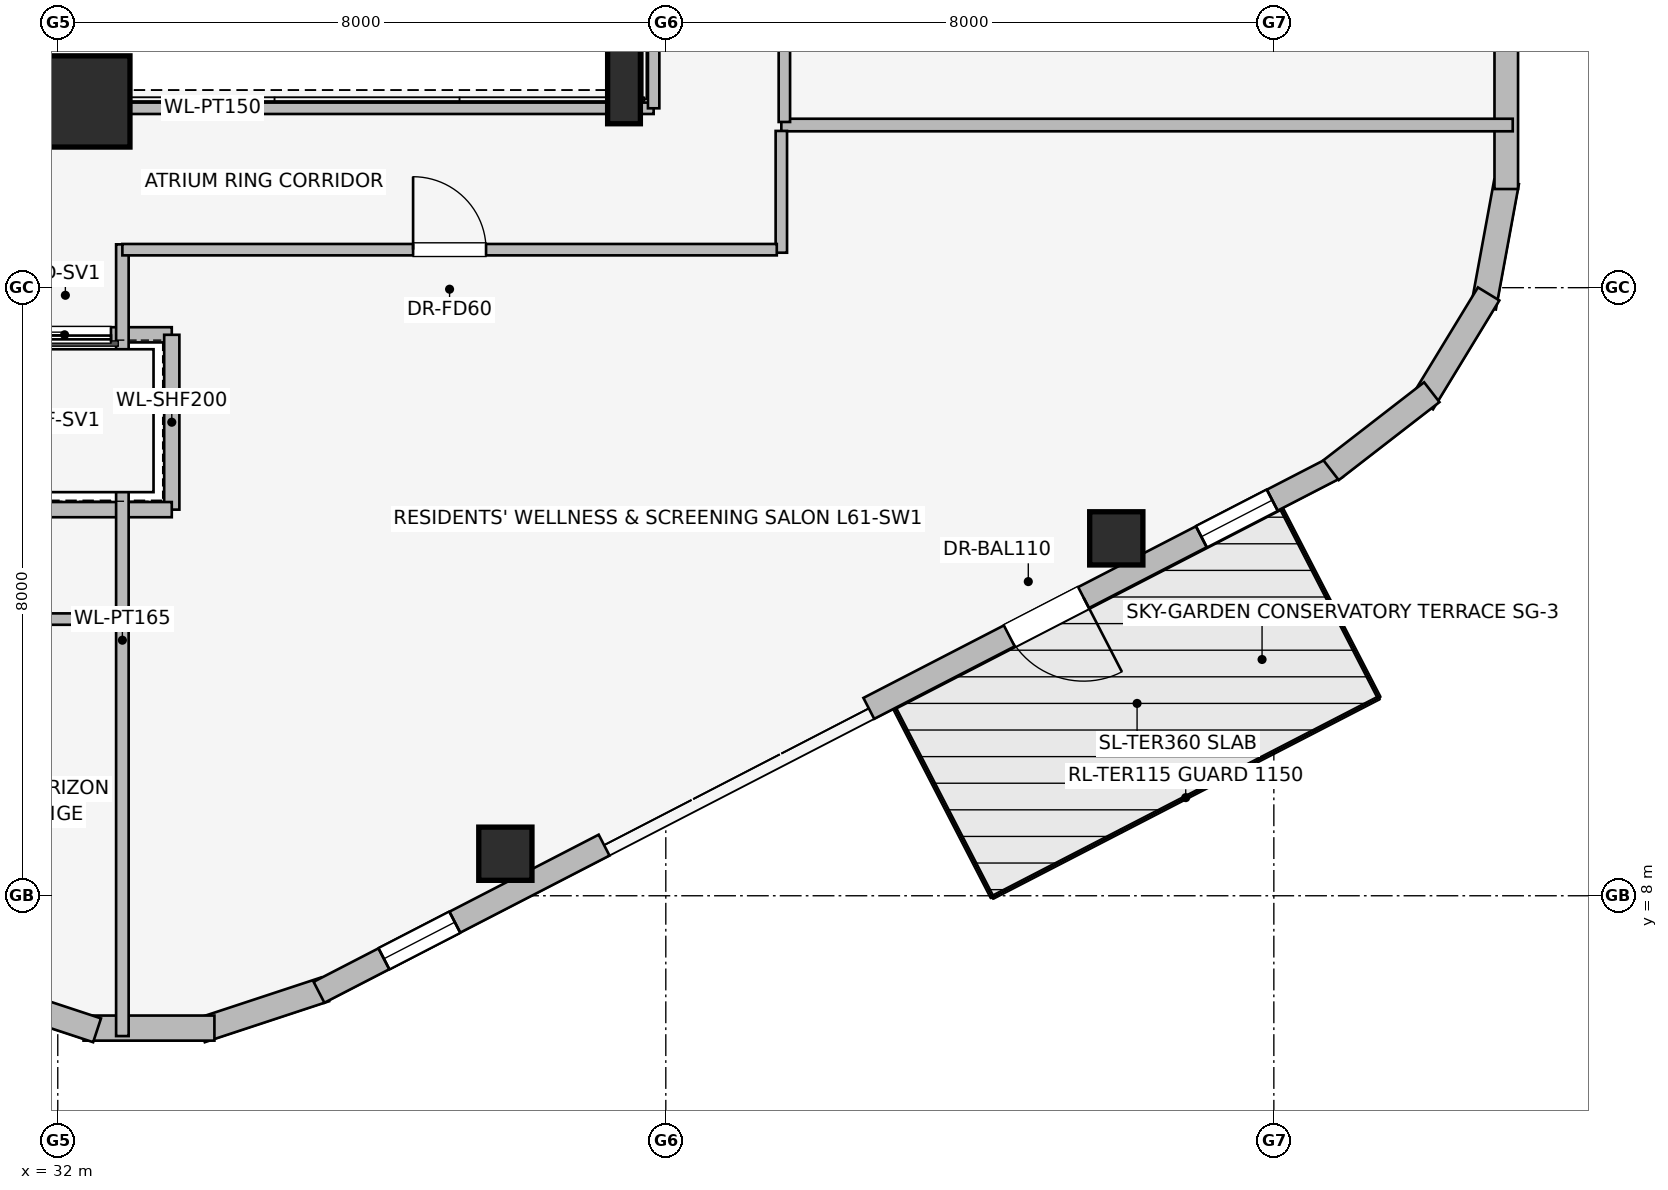
"""IFC4 building model, lengths in metres.
Left out: names, types, materials, properties, quantities, classifications, styles, units other than length and angle.
Written with IfcOpenShell. Run it as: python <this file> out.ifc"""

import sys

from ifc_helpers import new_model, si_unit, direction, frame, frame_2d, origin, origin_2d, place, context, subcontext, project, spatial, rectangle, i_section, extrude, element, fill, save


model = new_model("IFC4")
c1 = context("Model", 3, precision=1e-05, world=origin(), true_north=direction((0.0, 1.0)))
c2 = subcontext(c1, "Body", "Model", "MODEL_VIEW")
j1 = project(units=[si_unit("LENGTHUNIT", "METRE"), si_unit("PLANEANGLEUNIT", "RADIAN")], contexts=[c1])
p1 = place(None, origin())
s1 = spatial("IfcSite", under=j1, at=p1, CompositionType="ELEMENT")
p2 = place(p1, origin())
s2 = spatial("IfcBuilding", under=s1, at=p2, CompositionType="ELEMENT")
p3 = place(p2, frame((0.0, 0.0, 224.15)))
s3 = spatial("IfcBuildingStorey", under=s2, at=p3, CompositionType="ELEMENT", Elevation=224.15)
p4 = place(p3, frame((32.35, 18.45, 0.0), z_axis=(0.0, 0.0, 1.0), x_axis=(1.0, 0.0, 0.0)))
e1 = element("IfcColumn", 1, at=p4, inside=s3, PredefinedType="COLUMN", context=c2, shape_type="SweptSolid", body=[
    extrude(rectangle(XDim=1.2, YDim=1.2, at=origin_2d()), origin(), (0.0, 0.0, 1.0), 3.55),
])
for number, where, z_axis, x_axis in (
    (2, (37.889, 8.553, 0.0), (0.0, 0.0, 1.0), (1.0, 0.0, 0.0)),
    (3, (45.927, 12.702, 0.0), (0.0, 0.0, 1.0), (1.0, 0.0, 0.0)),
):
    element("IfcColumn", number, at=place(p3, frame(where, z_axis=z_axis, x_axis=x_axis)), inside=s3, PredefinedType="COLUMN", context=c2, shape_type="SweptSolid", body=[
        extrude(rectangle(XDim=0.7, YDim=0.7, at=origin_2d()), origin(), (0.0, 0.0, 1.0), 3.55),
    ])
p5 = place(p3, frame((39.45, 18.65, 0.0), z_axis=(0.0, 0.0, 1.0), x_axis=(1.0, 0.0, 0.0)))
e4 = element("IfcColumn", 4, at=p5, inside=s3, PredefinedType="COLUMN", context=c2, shape_type="SweptSolid", body=[
    extrude(i_section(OverallWidth=0.431, OverallDepth=0.987, WebThickness=0.034, FlangeThickness=0.062, at=origin_2d()), origin(), (0.0, 0.0, 1.0), 3.55),
])
p6 = place(p3, frame((35.518, 6.769, 0.0), z_axis=(0.0, 0.0, 1.0), x_axis=(-0.949713440491, -0.313120393699, 0.0)))
e5 = element("IfcWall", 5, at=p6, inside=s3, PredefinedType="STANDARD", context=c2, shape_type="SweptSolid", body=[
    extrude(rectangle(XDim=1.722, YDim=0.33, at=frame_2d((0.861, 0.0))), origin(), (0.0, 0.0, 1.0), 3.29),
])
p7 = place(p3, frame((34.061, 6.259, 0.0), z_axis=(0.0, 0.0, 1.0), x_axis=(-1.0, 0.0, 0.0)))
e6 = element("IfcWall", 6, at=p7, inside=s3, PredefinedType="STANDARD", context=c2, shape_type="SweptSolid", body=[
    extrude(rectangle(XDim=1.722, YDim=0.33, at=frame_2d((0.861, 0.0))), origin(), (0.0, 0.0, 1.0), 3.29),
])
p8 = place(p3, frame((32.517, 6.23, 0.0), z_axis=(0.0, 0.0, 1.0), x_axis=(-0.949713440491, 0.313120393699, 0.0)))
e7 = element("IfcWall", 7, at=p8, inside=s3, PredefinedType="STANDARD", context=c2, shape_type="SweptSolid", body=[
    extrude(rectangle(XDim=1.722, YDim=0.33, at=frame_2d((0.861, 0.0))), origin(), (0.0, 0.0, 1.0), 3.29),
])
p9 = place(p3, frame((48.834, 13.646, 0.0), z_axis=(0.0, 0.0, 1.0), x_axis=(-0.888622971019, -0.458638436437, 0.0)))
e8 = element("IfcWall", 8, at=p9, inside=s3, PredefinedType="STANDARD", context=c2, shape_type="SweptSolid", body=[
    extrude(rectangle(XDim=6.936, YDim=0.31, at=frame_2d((3.468, 0.0))), origin(), (0.0, 0.0, 1.0), 3.29),
])
p10 = place(p9, frame((3.756, 0.0, 0.0)))
e9 = element("IfcOpeningElement", 9, at=p10, cuts=e8, PredefinedType="OPENING", context=c2, shape_type="SweptSolid", body=[
    extrude(rectangle(XDim=1.1, YDim=2.04, at=frame_2d((0.55, 1.02))), frame((0.0, 0.165, 0.0), z_axis=(0.0, -1.0, 0.0), x_axis=(1.0, 0.0, 0.0)), (0.0, 0.0, 1.0), 0.33),
])
p11 = place(p9, frame((0.962, 0.0, 0.75)))
e10 = element("IfcOpeningElement", 10, at=p11, cuts=e8, PredefinedType="OPENING", context=c2, shape_type="SweptSolid", body=[
    extrude(rectangle(XDim=1.05, YDim=1.4, at=frame_2d((0.525, 0.7))), frame((0.0, 0.165, 0.0), z_axis=(0.0, -1.0, 0.0), x_axis=(1.0, 0.0, 0.0)), (0.0, 0.0, 1.0), 0.33),
])
p12 = place(p3, frame((39.188, 8.666, 0.0), z_axis=(0.0, 0.0, 1.0), x_axis=(-0.888616094641, -0.45865175934, 0.0)))
e11 = element("IfcWall", 11, at=p12, inside=s3, PredefinedType="STANDARD", context=c2, shape_type="SweptSolid", body=[
    extrude(rectangle(XDim=4.221, YDim=0.31, at=frame_2d((2.111, 0.0))), origin(), (0.0, 0.0, 1.0), 3.29),
])
p13 = place(p12, frame((2.21, 0.0, 0.75)))
e12 = element("IfcOpeningElement", 12, at=p13, cuts=e11, PredefinedType="OPENING", context=c2, shape_type="SweptSolid", body=[
    extrude(rectangle(XDim=1.05, YDim=1.4, at=frame_2d((0.525, 0.7))), frame((0.0, 0.165, 0.0), z_axis=(0.0, -1.0, 0.0), x_axis=(1.0, 0.0, 0.0)), (0.0, 0.0, 1.0), 0.33),
])
p14 = place(p3, frame((51.062, 17.392, 0.0), z_axis=(0.0, 0.0, 1.0), x_axis=(-0.180691763044, -0.983539773862, 0.0)))
e13 = element("IfcWall", 13, at=p14, inside=s3, PredefinedType="STANDARD", context=c2, shape_type="SweptSolid", body=[
    extrude(rectangle(XDim=1.677, YDim=0.33, at=frame_2d((0.838, 0.0))), origin(), (0.0, 0.0, 1.0), 3.29),
])
p15 = place(p3, frame((50.826, 15.918, 0.0), z_axis=(0.0, 0.0, 1.0), x_axis=(-0.520325409202, -0.853968072318, 0.0)))
e14 = element("IfcWall", 14, at=p15, inside=s3, PredefinedType="STANDARD", context=c2, shape_type="SweptSolid", body=[
    extrude(rectangle(XDim=1.678, YDim=0.33, at=frame_2d((0.839, 0.0))), origin(), (0.0, 0.0, 1.0), 3.29),
])
p16 = place(p3, frame((50.078, 14.625, 0.0), z_axis=(0.0, 0.0, 1.0), x_axis=(-0.790691856293, -0.61221433207, 0.0)))
e15 = element("IfcWall", 15, at=p16, inside=s3, PredefinedType="STANDARD", context=c2, shape_type="SweptSolid", body=[
    extrude(rectangle(XDim=1.676, YDim=0.33, at=frame_2d((0.838, 0.0))), origin(), (0.0, 0.0, 1.0), 3.29),
])
p17 = place(p3, frame((51.058, 30.702, 0.0), z_axis=(0.0, 0.0, 1.0), x_axis=(0.0, -1.0, 0.0)))
e16 = element("IfcWall", 16, at=p17, inside=s3, PredefinedType="STANDARD", context=c2, shape_type="SweptSolid", body=[
    extrude(rectangle(XDim=13.404, YDim=0.31, at=frame_2d((6.702, 0.0))), origin(), (0.0, 0.0, 1.0), 3.29),
])
p18 = place(p17, frame((4.706, 0.0, 0.75)))
e17 = element("IfcOpeningElement", 17, at=p18, cuts=e16, PredefinedType="OPENING", context=c2, shape_type="SweptSolid", body=[
    extrude(rectangle(XDim=2.4, YDim=1.6, at=frame_2d((1.2, 0.8))), frame((0.0, 0.165, 0.0), z_axis=(0.0, -1.0, 0.0), x_axis=(1.0, 0.0, 0.0)), (0.0, 0.0, 1.0), 0.33),
])
p19 = place(p17, frame((8.807, 0.0, 0.75)))
e18 = element("IfcOpeningElement", 18, at=p19, cuts=e16, PredefinedType="OPENING", context=c2, shape_type="SweptSolid", body=[
    extrude(rectangle(XDim=1.05, YDim=1.4, at=frame_2d((0.525, 0.7))), frame((0.0, 0.165, 0.0), z_axis=(0.0, -1.0, 0.0), x_axis=(1.0, 0.0, 0.0)), (0.0, 0.0, 1.0), 0.33),
])
p20 = place(p3, frame((33.5, 15.38, 0.0), z_axis=(0.0, 0.0, 1.0), x_axis=(-1.0, 0.0, 0.0)))
e19 = element("IfcWall", 19, at=p20, inside=s3, PredefinedType="PARTITIONING", context=c2, shape_type="SweptSolid", body=[
    extrude(rectangle(XDim=2.82, YDim=0.2, at=frame_2d((1.41, 0.0))), origin(), (0.0, 0.0, 1.0), 3.29),
])
p21 = place(p20, frame((0.8, 0.0, 0.0)))
e20 = element("IfcOpeningElement", 20, at=p21, cuts=e19, PredefinedType="OPENING", context=c2, shape_type="SweptSolid", body=[
    extrude(rectangle(XDim=1.2, YDim=2.2, at=frame_2d((0.6, 1.1))), frame((0.0, 0.11, 0.0), z_axis=(0.0, -1.0, 0.0), x_axis=(1.0, 0.0, 0.0)), (0.0, 0.0, 1.0), 0.22),
])
p22 = place(p3, frame((33.5, 13.08, 0.0), z_axis=(0.0, 0.0, 1.0), x_axis=(0.0, 1.0, 0.0)))
e21 = element("IfcWall", 21, at=p22, inside=s3, PredefinedType="PARTITIONING", context=c2, shape_type="SweptSolid", body=[
    extrude(rectangle(XDim=2.3, YDim=0.2, at=frame_2d((1.15, 0.0))), origin(), (0.0, 0.0, 1.0), 3.29),
])
p23 = place(p3, frame((30.879, 13.08, 0.0), z_axis=(0.0, 0.0, 1.0), x_axis=(1.0, 0.0, 0.0)))
e22 = element("IfcWall", 22, at=p23, inside=s3, PredefinedType="PARTITIONING", context=c2, shape_type="SweptSolid", body=[
    extrude(rectangle(XDim=2.621, YDim=0.2, at=frame_2d((1.311, 0.0))), origin(), (0.0, 0.0, 1.0), 3.29),
])
p24 = place(p3, frame((27.675, 18.36, 0.0), z_axis=(0.0, 0.0, 1.0), x_axis=(1.0, 0.0, 0.0)))
e23 = element("IfcWall", 23, at=p24, inside=s3, PredefinedType="PARTITIONING", context=c2, shape_type="SweptSolid", body=[
    extrude(rectangle(XDim=12.165, YDim=0.15, at=frame_2d((6.083, 0.0))), origin(), (0.0, 0.0, 1.0), 2.431),
])
p25 = place(p3, frame((39.84, 18.36, 0.0), z_axis=(0.0, 0.0, 1.0), x_axis=(0.0, 1.0, 0.0)))
e24 = element("IfcWall", 24, at=p25, inside=s3, PredefinedType="PARTITIONING", context=c2, shape_type="SweptSolid", body=[
    extrude(rectangle(XDim=11.28, YDim=0.15, at=frame_2d((5.64, 0.0))), origin(), (0.0, 0.0, 1.0), 3.29),
])
p26 = place(p3, frame((32.85, 6.154, 0.0), z_axis=(0.0, 0.0, 1.0), x_axis=(0.0, 1.0, 0.0)))
e25 = element("IfcWall", 25, at=p26, inside=s3, PredefinedType="PARTITIONING", context=c2, shape_type="SweptSolid", body=[
    extrude(rectangle(XDim=10.416, YDim=0.165, at=frame_2d((5.208, 0.0))), origin(), (0.0, 0.0, 1.0), 3.29),
])
p27 = place(p3, frame((21.244, 11.64, 0.0), z_axis=(0.0, 0.0, 1.0), x_axis=(1.0, 0.0, 0.0)))
e26 = element("IfcWall", 26, at=p27, inside=s3, PredefinedType="PARTITIONING", context=c2, shape_type="SweptSolid", body=[
    extrude(rectangle(XDim=11.606, YDim=0.15, at=frame_2d((5.803, 0.0))), origin(), (0.0, 0.0, 1.0), 2.833),
])
p28 = place(p27, frame((4.856, 0.0, 0.0)))
e27 = element("IfcOpeningElement", 27, at=p28, cuts=e26, PredefinedType="OPENING", context=c2, shape_type="SweptSolid", body=[
    extrude(rectangle(XDim=0.9, YDim=2.0, at=frame_2d((0.45, 1.0))), frame((0.0, 0.085, 0.0), z_axis=(0.0, -1.0, 0.0), x_axis=(1.0, 0.0, 0.0)), (0.0, 0.0, 1.0), 0.17),
])
p29 = place(p27, frame((8.306, 0.0, 0.0)))
e28 = element("IfcOpeningElement", 28, at=p29, cuts=e26, PredefinedType="OPENING", context=c2, shape_type="SweptSolid", body=[
    extrude(rectangle(XDim=0.9, YDim=2.0, at=frame_2d((0.45, 1.0))), frame((0.0, 0.085, 0.0), z_axis=(0.0, -1.0, 0.0), x_axis=(1.0, 0.0, 0.0)), (0.0, 0.0, 1.0), 0.17),
])
p30 = place(p3, frame((41.52, 18.14, 0.0), z_axis=(0.0, 0.0, 1.0), x_axis=(1.0, 0.0, 0.0)))
e29 = element("IfcWall", 29, at=p30, inside=s3, PredefinedType="PARTITIONING", context=c2, shape_type="SweptSolid", body=[
    extrude(rectangle(XDim=9.623, YDim=0.165, at=frame_2d((4.812, 0.0))), origin(), (0.0, 0.0, 1.0), 3.29),
])
p31 = place(p3, frame((41.56, 18.18, 0.0), z_axis=(0.0, 0.0, 1.0), x_axis=(0.0, 1.0, 0.0)))
e30 = element("IfcWall", 30, at=p31, inside=s3, PredefinedType="PARTITIONING", context=c2, shape_type="SweptSolid", body=[
    extrude(rectangle(XDim=4.405, YDim=0.15, at=frame_2d((2.203, 0.0))), origin(), (0.0, 0.0, 1.0), 3.29),
])
p32 = place(p31, frame((1.723, 0.0, 0.0)))
e31 = element("IfcOpeningElement", 31, at=p32, cuts=e30, PredefinedType="OPENING", context=c2, shape_type="SweptSolid", body=[
    extrude(rectangle(XDim=0.96, YDim=2.0, at=frame_2d((0.48, 1.0))), frame((0.0, 0.085, 0.0), z_axis=(0.0, -1.0, 0.0), x_axis=(1.0, 0.0, 0.0)), (0.0, 0.0, 1.0), 0.17),
])
p33 = place(p3, frame((41.52, 16.46, 0.0), z_axis=(0.0, 0.0, 1.0), x_axis=(0.0, 1.0, 0.0)))
e32 = element("IfcWall", 32, at=p33, inside=s3, PredefinedType="PARTITIONING", context=c2, shape_type="SweptSolid", body=[
    extrude(rectangle(XDim=1.602, YDim=0.15, at=frame_2d((0.801, 0.0))), origin(), (0.0, 0.0, 1.0), 3.29),
])
p34 = place(p3, frame((32.85, 16.5, 0.0), z_axis=(0.0, 0.0, 1.0), x_axis=(1.0, 0.0, 0.0)))
e33 = element("IfcWall", 33, at=p34, inside=s3, PredefinedType="PARTITIONING", context=c2, shape_type="SweptSolid", body=[
    extrude(rectangle(XDim=8.61, YDim=0.15, at=frame_2d((4.305, 0.0))), origin(), (0.0, 0.0, 1.0), 3.29),
])
p35 = place(p34, frame((3.825, 0.0, 0.0)))
e34 = element("IfcOpeningElement", 34, at=p35, cuts=e33, PredefinedType="OPENING", context=c2, shape_type="SweptSolid", body=[
    extrude(rectangle(XDim=0.96, YDim=2.0, at=frame_2d((0.48, 1.0))), frame((0.0, 0.085, 0.0), z_axis=(0.0, -1.0, 0.0), x_axis=(1.0, 0.0, 0.0)), (0.0, 0.0, 1.0), 0.17),
])
p36 = place(p10, origin())
e35 = element("IfcDoor", 35, at=p36, inside=s3, OperationType="SINGLE_SWING_LEFT", PredefinedType="DOOR", context=c2, shape_type="SweptSolid", body=[
    extrude(rectangle(XDim=1.1, YDim=2.04, at=frame_2d((0.55, 1.02))), frame((0.0, 0.025, 0.0), z_axis=(0.0, -1.0, 0.0), x_axis=(1.0, 0.0, 0.0)), (0.0, 0.0, 1.0), 0.05),
])
fill(e9, e35)
p37 = place(p11, origin())
e36 = element("IfcWindow", 36, at=p37, inside=s3, PartitioningType="SINGLE_PANEL", PredefinedType="WINDOW", context=c2, shape_type="SweptSolid", body=[
    extrude(rectangle(XDim=1.05, YDim=1.4, at=frame_2d((0.525, 0.7))), frame((0.0, 0.03, 0.0), z_axis=(0.0, -1.0, 0.0), x_axis=(1.0, 0.0, 0.0)), (0.0, 0.0, 1.0), 0.06),
])
fill(e10, e36)
p38 = place(p13, origin())
e37 = element("IfcWindow", 37, at=p38, inside=s3, PartitioningType="SINGLE_PANEL", PredefinedType="WINDOW", context=c2, shape_type="SweptSolid", body=[
    extrude(rectangle(XDim=1.05, YDim=1.4, at=frame_2d((0.525, 0.7))), frame((0.0, 0.03, 0.0), z_axis=(0.0, -1.0, 0.0), x_axis=(1.0, 0.0, 0.0)), (0.0, 0.0, 1.0), 0.06),
])
fill(e12, e37)
p39 = place(p21, origin())
e38 = element("IfcDoor", 38, at=p39, inside=s3, OperationType="SLIDING_TO_RIGHT", PredefinedType="DOOR", context=c2, shape_type="SweptSolid", body=[
    extrude(rectangle(XDim=1.2, YDim=2.2, at=frame_2d((0.6, 1.1))), frame((0.0, 0.025, 0.0), z_axis=(0.0, -1.0, 0.0), x_axis=(1.0, 0.0, 0.0)), (0.0, 0.0, 1.0), 0.05),
])
fill(e20, e38)
p40 = place(p35, origin())
e39 = element("IfcDoor", 39, at=p40, inside=s3, OperationType="SINGLE_SWING_LEFT", PredefinedType="DOOR", context=c2, shape_type="SweptSolid", body=[
    extrude(rectangle(XDim=0.96, YDim=2.0, at=frame_2d((0.48, 1.0))), frame((0.0, 0.025, 0.0), z_axis=(0.0, -1.0, 0.0), x_axis=(1.0, 0.0, 0.0)), (0.0, 0.0, 1.0), 0.05),
])
fill(e34, e39)
save(model, sys.argv[1])
